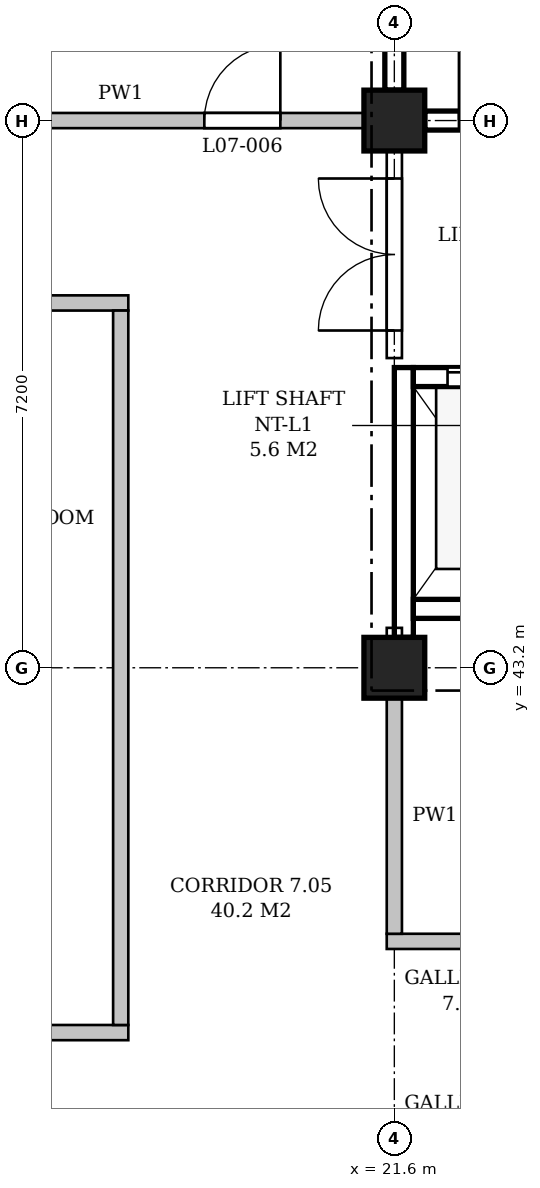
"""IFC4 building model, lengths in metres.
Left out: names, types, materials, properties, quantities, classifications, styles, units other than length and angle.
Written with IfcOpenShell. Run it as: python <this file> out.ifc"""

import sys

from ifc_helpers import new_model, si_unit, direction, frame, frame_2d, origin, origin_2d, place, context, subcontext, project, spatial, polyline, rectangle, outline, extrude, element, fill, save


model = new_model("IFC4")
c1 = context("Model", 3, precision=1e-05, world=origin(), true_north=direction((0.0, 1.0)))
c2 = subcontext(c1, "Body", "Model", "MODEL_VIEW")
j1 = project(units=[si_unit("LENGTHUNIT", "METRE"), si_unit("PLANEANGLEUNIT", "RADIAN")], contexts=[c1])
p1 = place(None, origin())
s1 = spatial("IfcSite", under=j1, at=p1, CompositionType="ELEMENT")
p2 = place(p1, origin())
s2 = spatial("IfcBuilding", under=s1, at=p2, CompositionType="ELEMENT")
p3 = place(p2, frame((0.0, 0.0, 36.0)))
s3 = spatial("IfcBuildingStorey", under=s2, at=p3, CompositionType="ELEMENT", Elevation=36.0)
for number, where, z_axis, x_axis in (
    (1, (21.6, 43.2, 0.0), (0.0, 0.0, 1.0), (1.0, 0.0, 0.0)),
    (2, (21.6, 50.4, 0.0), (0.0, 0.0, 1.0), (1.0, 0.0, 0.0)),
):
    element("IfcColumn", number, at=place(p3, frame(where, z_axis=z_axis, x_axis=x_axis)), inside=s3, PredefinedType="COLUMN", context=c2, shape_type="SweptSolid", body=[
        extrude(rectangle(XDim=0.8, YDim=0.8, at=origin_2d()), origin(), (0.0, 0.0, 1.0), 4.8),
    ])
p4 = place(p3, frame((22.0, 50.4, 0.0), z_axis=(0.0, 0.0, 1.0), x_axis=(1.0, 0.0, 0.0)))
e3 = element("IfcWall", 3, at=p4, inside=s3, PredefinedType="SHEAR", context=c2, shape_type="SweptSolid", body=[
    extrude(rectangle(XDim=6.4, YDim=0.25, at=frame_2d((3.2, 0.0))), origin(), (0.0, 0.0, 1.0), 3.85),
])
p5 = place(p4, frame((0.45, 0.0, 0.0)))
e4 = element("IfcOpeningElement", 4, at=p5, cuts=e3, PredefinedType="OPENING", context=c2, shape_type="SweptSolid", body=[
    extrude(rectangle(XDim=1.1, YDim=2.1, at=frame_2d((0.55, 1.05))), frame((0.0, 0.135, 0.0), z_axis=(0.0, -1.0, 0.0), x_axis=(1.0, 0.0, 0.0)), (0.0, 0.0, 1.0), 0.27),
])
p6 = place(p3, frame((21.6, 50.8, 0.0), z_axis=(0.0, 0.0, 1.0), x_axis=(0.0, 1.0, 0.0)))
e5 = element("IfcWall", 5, at=p6, inside=s3, PredefinedType="SHEAR", context=c2, shape_type="SweptSolid", body=[
    extrude(rectangle(XDim=6.4, YDim=0.25, at=frame_2d((3.2, 0.0))), origin(), (0.0, 0.0, 1.0), 3.85),
])
p7 = place(p3, frame((21.725, 43.6, -0.25), z_axis=(0.0, 0.0, 1.0), x_axis=(0.0, 1.0, 0.0)))
e6 = element("IfcWall", 6, at=p7, inside=s3, PredefinedType="SHEAR", context=c2, shape_type="SweptSolid", body=[
    extrude(rectangle(XDim=3.55, YDim=0.25, at=frame_2d((1.775, 0.0))), origin(), (0.0, 0.0, 1.0), 4.1),
])
p8 = place(p3, frame((21.85, 47.025, -0.25), z_axis=(0.0, 0.0, 1.0), x_axis=(1.0, 0.0, 0.0)))
e7 = element("IfcWall", 7, at=p8, inside=s3, PredefinedType="SHEAR", context=c2, shape_type="SweptSolid", body=[
    extrude(rectangle(XDim=2.0, YDim=0.25, at=frame_2d((1.0, 0.0))), origin(), (0.0, 0.0, 1.0), 4.8),
])
p9 = place(p8, frame((0.45, 0.0, 0.25)))
e8 = element("IfcOpeningElement", 8, at=p9, cuts=e7, PredefinedType="OPENING", context=c2, shape_type="SweptSolid", body=[
    extrude(rectangle(XDim=1.1, YDim=2.1, at=frame_2d((0.55, 1.05))), frame((0.0, 0.135, 0.0), z_axis=(0.0, -1.0, 0.0), x_axis=(1.0, 0.0, 0.0)), (0.0, 0.0, 1.0), 0.27),
])
p10 = place(p3, frame((21.85, 43.975, -0.25), z_axis=(0.0, 0.0, 1.0), x_axis=(1.0, 0.0, 0.0)))
e9 = element("IfcWall", 9, at=p10, inside=s3, PredefinedType="SHEAR", context=c2, shape_type="SweptSolid", body=[
    extrude(rectangle(XDim=2.0, YDim=0.25, at=frame_2d((1.0, 0.0))), origin(), (0.0, 0.0, 1.0), 4.8),
])
p11 = place(p3, frame((3.5, 38.4, 0.0), z_axis=(0.0, 0.0, 1.0), x_axis=(1.0, 0.0, 0.0)))
e10 = element("IfcWall", 10, at=p11, inside=s3, PredefinedType="PARTITIONING", context=c2, shape_type="SweptSolid", body=[
    extrude(outline(polyline([(0.0, 0.0), (14.6, 0.0), (14.6, 4.55), (11.125, 4.55), (11.125, 3.85), (10.675, 3.85), (10.675, 4.55), (3.925, 4.55), (3.925, 3.85), (3.475, 3.85), (3.475, 4.55), (0.0, 4.55), (0.0, 0.0)])), frame((0.0, 0.1, 0.0), z_axis=(0.0, -1.0, 0.0), x_axis=(1.0, 0.0, 0.0)), (0.0, 0.0, 1.0), 0.2),
])
p12 = place(p3, frame((21.5, 39.6, 0.0), z_axis=(0.0, 0.0, 1.0), x_axis=(1.0, 0.0, 0.0)))
e11 = element("IfcWall", 11, at=p12, inside=s3, PredefinedType="PARTITIONING", context=c2, shape_type="SweptSolid", body=[
    extrude(outline(polyline([(0.0, 0.0), (7.15, 0.0), (7.1, 4.55), (0.325, 4.55), (0.325, 3.85), (0.0, 3.85), (0.0, 0.0)])), frame((0.0, 0.1, 0.0), z_axis=(0.0, -1.0, 0.0), x_axis=(1.0, 0.0, 0.0)), (0.0, 0.0, 1.0), 0.2),
])
p13 = place(p12, frame((3.125, 0.0, 0.0)))
e12 = element("IfcOpeningElement", 12, at=p13, cuts=e11, PredefinedType="OPENING", context=c2, shape_type="SweptSolid", body=[
    extrude(rectangle(XDim=1.0, YDim=2.1, at=frame_2d((0.5, 1.05))), frame((0.0, 0.11, 0.0), z_axis=(0.0, -1.0, 0.0), x_axis=(1.0, 0.0, 0.0)), (0.0, 0.0, 1.0), 0.22),
])
p14 = place(p3, frame((3.5, 48.0, 0.0), z_axis=(0.0, 0.0, 1.0), x_axis=(1.0, 0.0, 0.0)))
e13 = element("IfcWall", 13, at=p14, inside=s3, PredefinedType="PARTITIONING", context=c2, shape_type="SweptSolid", body=[
    extrude(outline(polyline([(0.0, 0.0), (14.6, 0.0), (14.6, 4.55), (11.125, 4.55), (11.125, 3.85), (10.675, 3.85), (10.675, 4.55), (3.925, 4.55), (3.925, 3.85), (3.475, 3.85), (3.475, 4.55), (0.0, 4.55), (0.0, 0.0)])), frame((0.0, 0.1, 0.0), z_axis=(0.0, -1.0, 0.0), x_axis=(1.0, 0.0, 0.0)), (0.0, 0.0, 1.0), 0.2),
])
p15 = place(p14, frame((5.0, 0.0, 0.0)))
e14 = element("IfcOpeningElement", 14, at=p15, cuts=e13, PredefinedType="OPENING", context=c2, shape_type="SweptSolid", body=[
    extrude(rectangle(XDim=1.0, YDim=2.1, at=frame_2d((0.5, 1.05))), frame((0.0, 0.11, 0.0), z_axis=(0.0, -1.0, 0.0), x_axis=(1.0, 0.0, 0.0)), (0.0, 0.0, 1.0), 0.22),
])
p16 = place(p14, frame((8.6, 0.0, 0.0)))
e15 = element("IfcOpeningElement", 15, at=p16, cuts=e13, PredefinedType="OPENING", context=c2, shape_type="SweptSolid", body=[
    extrude(rectangle(XDim=1.0, YDim=2.1, at=frame_2d((0.5, 1.05))), frame((0.0, 0.11, 0.0), z_axis=(0.0, -1.0, 0.0), x_axis=(1.0, 0.0, 0.0)), (0.0, 0.0, 1.0), 0.22),
])
p17 = place(p3, frame((14.8, 50.4, 0.0), z_axis=(0.0, 0.0, 1.0), x_axis=(1.0, 0.0, 0.0)))
e16 = element("IfcWall", 16, at=p17, inside=s3, PredefinedType="PARTITIONING", context=c2, shape_type="SweptSolid", body=[
    extrude(rectangle(XDim=6.4, YDim=0.2, at=frame_2d((3.2, 0.0))), origin(), (0.0, 0.0, 1.0), 3.85),
])
p18 = place(p17, frame((4.3, 0.0, 0.0)))
e17 = element("IfcOpeningElement", 17, at=p18, cuts=e16, PredefinedType="OPENING", context=c2, shape_type="SweptSolid", body=[
    extrude(rectangle(XDim=1.0, YDim=2.1, at=frame_2d((0.5, 1.05))), frame((0.0, 0.11, 0.0), z_axis=(0.0, -1.0, 0.0), x_axis=(1.0, 0.0, 0.0)), (0.0, 0.0, 1.0), 0.22),
])
p19 = place(p3, frame((18.0, 38.5, 0.0), z_axis=(0.0, 0.0, 1.0), x_axis=(0.0, 1.0, 0.0)))
e18 = element("IfcWall", 18, at=p19, inside=s3, PredefinedType="PARTITIONING", context=c2, shape_type="SweptSolid", body=[
    extrude(outline(polyline([(0.0, 0.0), (9.4, 0.0), (9.4, 4.55), (4.925, 4.55), (4.925, 3.85), (4.475, 3.85), (4.475, 4.55), (0.0, 4.55), (0.0, 0.0)])), frame((0.0, 0.1, 0.0), z_axis=(0.0, -1.0, 0.0), x_axis=(1.0, 0.0, 0.0)), (0.0, 0.0, 1.0), 0.2),
])
p20 = place(p3, frame((21.6, 39.7, 0.0), z_axis=(0.0, 0.0, 1.0), x_axis=(0.0, 1.0, 0.0)))
e19 = element("IfcWall", 19, at=p20, inside=s3, PredefinedType="PARTITIONING", context=c2, shape_type="SweptSolid", body=[
    extrude(rectangle(XDim=3.1, YDim=0.2, at=frame_2d((1.55, 0.0))), origin(), (0.0, 0.0, 1.0), 3.85),
])
p21 = place(p3, frame((21.6, 43.6, 0.0), z_axis=(0.0, 0.0, 1.0), x_axis=(0.0, 1.0, 0.0)))
e20 = element("IfcWall", 20, at=p21, inside=s3, PredefinedType="PARTITIONING", context=c2, shape_type="SweptSolid", body=[
    extrude(rectangle(XDim=0.125, YDim=0.2, at=frame_2d((0.062, 0.0))), origin(), (0.0, 0.0, 1.0), 3.85),
])
p22 = place(p3, frame((21.6, 47.275, 0.0), z_axis=(0.0, 0.0, 1.0), x_axis=(0.0, 1.0, 0.0)))
e21 = element("IfcWall", 21, at=p22, inside=s3, PredefinedType="PARTITIONING", context=c2, shape_type="SweptSolid", body=[
    extrude(rectangle(XDim=2.725, YDim=0.2, at=frame_2d((1.363, 0.0))), origin(), (0.0, 0.0, 1.0), 3.85),
])
p23 = place(p22, frame((0.363, 0.0, 0.0)))
e22 = element("IfcOpeningElement", 22, at=p23, cuts=e21, PredefinedType="OPENING", context=c2, shape_type="SweptSolid", body=[
    extrude(rectangle(XDim=2.0, YDim=2.4, at=frame_2d((1.0, 1.2))), frame((0.0, 0.11, 0.0), z_axis=(0.0, -1.0, 0.0), x_axis=(1.0, 0.0, 0.0)), (0.0, 0.0, 1.0), 0.22),
])
p24 = place(p5, origin())
e23 = element("IfcDoor", 23, at=p24, inside=s3, OperationType="SINGLE_SWING_LEFT", PredefinedType="DOOR", context=c2, shape_type="SweptSolid", body=[
    extrude(rectangle(XDim=1.1, YDim=2.1, at=frame_2d((0.55, 1.05))), frame((0.0, 0.025, 0.0), z_axis=(0.0, -1.0, 0.0), x_axis=(1.0, 0.0, 0.0)), (0.0, 0.0, 1.0), 0.05),
])
fill(e4, e23)
p25 = place(p9, origin())
e24 = element("IfcDoor", 24, at=p25, inside=s3, OperationType="SLIDING_TO_LEFT", PredefinedType="DOOR", context=c2, shape_type="SweptSolid", body=[
    extrude(rectangle(XDim=1.1, YDim=2.1, at=frame_2d((0.55, 1.05))), frame((0.0, 0.025, 0.0), z_axis=(0.0, -1.0, 0.0), x_axis=(1.0, 0.0, 0.0)), (0.0, 0.0, 1.0), 0.05),
])
fill(e8, e24)
p26 = place(p23, origin())
e25 = element("IfcDoor", 25, at=p26, inside=s3, OperationType="DOUBLE_DOOR_SINGLE_SWING", PredefinedType="DOOR", context=c2, shape_type="SweptSolid", body=[
    extrude(rectangle(XDim=2.0, YDim=2.4, at=frame_2d((1.0, 1.2))), frame((0.0, 0.025, 0.0), z_axis=(0.0, -1.0, 0.0), x_axis=(1.0, 0.0, 0.0)), (0.0, 0.0, 1.0), 0.05),
])
fill(e22, e25)
p27 = place(p18, origin())
e26 = element("IfcDoor", 26, at=p27, inside=s3, OperationType="SINGLE_SWING_RIGHT", PredefinedType="DOOR", context=c2, shape_type="SweptSolid", body=[
    extrude(rectangle(XDim=1.0, YDim=2.1, at=frame_2d((0.5, 1.05))), frame((0.0, 0.025, 0.0), z_axis=(0.0, -1.0, 0.0), x_axis=(1.0, 0.0, 0.0)), (0.0, 0.0, 1.0), 0.05),
])
fill(e17, e26)
save(model, sys.argv[1])
